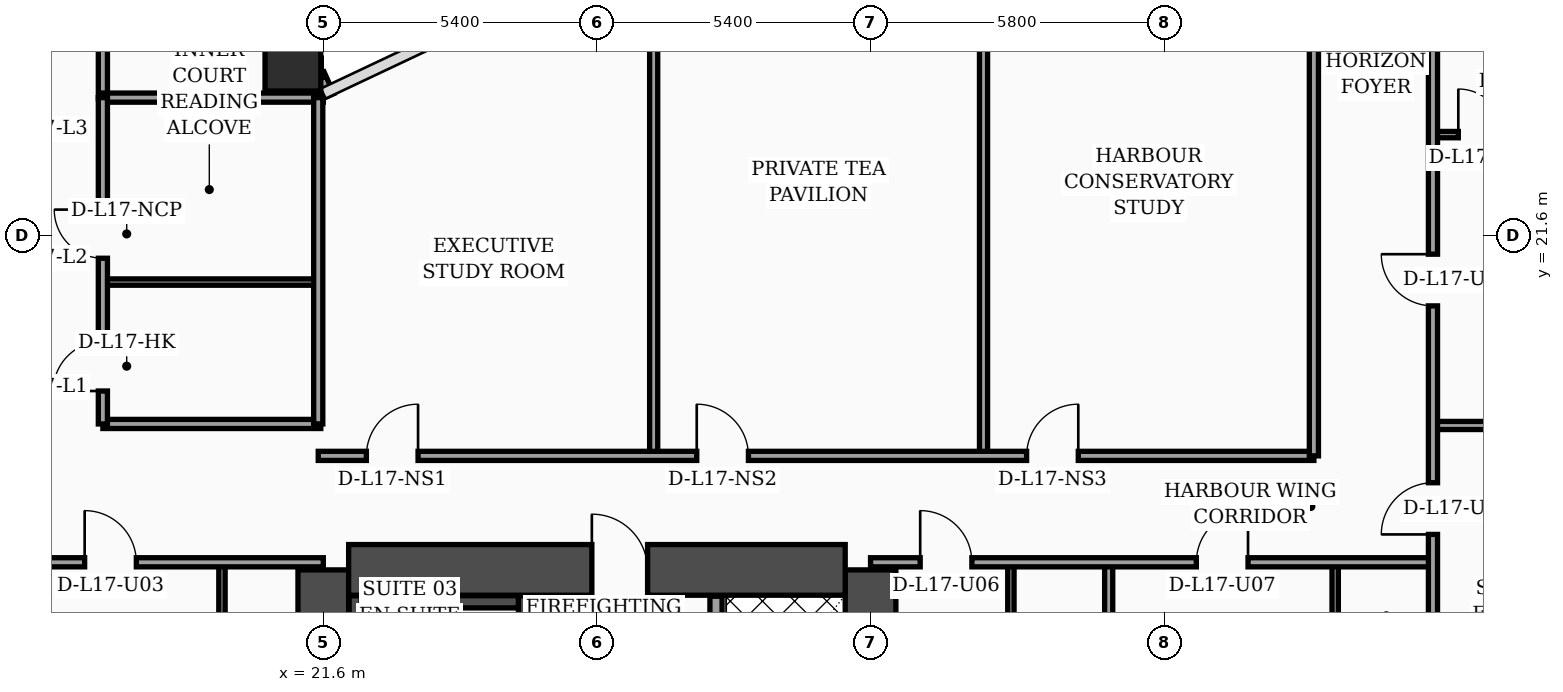
"""IFC4 building model, lengths in metres.
Left out: names, types, materials, properties, quantities, classifications, styles, units other than length and angle.
Written with IfcOpenShell. Run it as: python <this file> out.ifc"""

import sys

from ifc_helpers import new_model, si_unit, direction, frame, frame_2d, origin, origin_2d, place, context, subcontext, project, spatial, rectangle, hollow_rectangle, extrude, element, fill, save


model = new_model("IFC4")
c1 = context("Model", 3, precision=1e-05, world=origin(), true_north=direction((0.0, 1.0)))
c2 = subcontext(c1, "Body", "Model", "MODEL_VIEW")
j1 = project(units=[si_unit("LENGTHUNIT", "METRE"), si_unit("PLANEANGLEUNIT", "RADIAN")], contexts=[c1])
p1 = place(None, origin())
s1 = spatial("IfcSite", under=j1, at=p1, CompositionType="ELEMENT")
p2 = place(p1, origin())
s2 = spatial("IfcBuilding", under=s1, at=p2, CompositionType="ELEMENT")
p3 = place(p2, frame((0.0, 0.0, 73.6)))
s3 = spatial("IfcBuildingStorey", under=s2, at=p3, CompositionType="ELEMENT", Elevation=73.6)
for number, where, z_axis, x_axis in (
    (1, (21.6, 4.6, 0.0), (0.0, 0.0, 1.0), (0.0, 1.0, 0.0)),
    (2, (32.4, 4.6, 0.0), (0.0, 0.0, 1.0), (0.0, 1.0, 0.0)),
):
    element("IfcWall", number, at=place(p3, frame(where, z_axis=z_axis, x_axis=x_axis)), inside=s3, PredefinedType="SHEAR", context=c2, shape_type="SweptSolid", body=[
        extrude(rectangle(XDim=10.4, YDim=1.0, at=frame_2d((5.2, 0.0))), origin(), (0.0, 0.0, 1.0), 3.56),
    ])
p4 = place(p3, frame((22.1, 15.0, 0.0), z_axis=(0.0, 0.0, 1.0), x_axis=(1.0, 0.0, 0.0)))
e3 = element("IfcWall", 3, at=p4, inside=s3, PredefinedType="SHEAR", context=c2, shape_type="SweptSolid", body=[
    extrude(rectangle(XDim=9.8, YDim=1.0, at=frame_2d((4.9, 0.0))), origin(), (0.0, 0.0, 1.0), 3.56),
])
p5 = place(p4, frame((4.8, 0.0, 0.0)))
e4 = element("IfcOpeningElement", 4, at=p5, cuts=e3, PredefinedType="OPENING", context=c2, shape_type="SweptSolid", body=[
    extrude(rectangle(XDim=1.1, YDim=2.2, at=frame_2d((0.55, 1.1))), frame((0.0, 0.51, 0.0), z_axis=(0.0, -1.0, 0.0), x_axis=(1.0, 0.0, 0.0)), (0.0, 0.0, 1.0), 1.02),
])
p6 = place(p3, frame((22.23, 5.1, 0.0), z_axis=(0.0, 0.0, 1.0), x_axis=(0.0, 1.0, 0.0)))
e5 = element("IfcWall", 5, at=p6, inside=s3, PredefinedType="SOLIDWALL", context=c2, shape_type="SweptSolid", body=[
    extrude(rectangle(XDim=9.39, YDim=0.24, at=frame_2d((4.695, 0.0))), origin(), (0.0, 0.0, 1.0), 3.56),
])
p7 = place(p3, frame((25.57, 5.1, 0.0), z_axis=(0.0, 0.0, 1.0), x_axis=(0.0, 1.0, 0.0)))
e6 = element("IfcWall", 6, at=p7, inside=s3, PredefinedType="SOLIDWALL", context=c2, shape_type="SweptSolid", body=[
    extrude(rectangle(XDim=9.39, YDim=0.24, at=frame_2d((4.695, 0.0))), origin(), (0.0, 0.0, 1.0), 3.56),
])
p8 = place(p7, frame((0.35, 0.0, 0.0)))
e7 = element("IfcOpeningElement", 7, at=p8, cuts=e6, PredefinedType="OPENING", context=c2, shape_type="SweptSolid", body=[
    extrude(rectangle(XDim=1.15, YDim=2.2, at=frame_2d((0.575, 1.1))), frame((0.0, 0.13, 0.0), z_axis=(0.0, -1.0, 0.0), x_axis=(1.0, 0.0, 0.0)), (0.0, 0.0, 1.0), 0.26),
])
p9 = place(p3, frame((22.35, 14.37, 0.0), z_axis=(0.0, 0.0, 1.0), x_axis=(1.0, 0.0, 0.0)))
e8 = element("IfcWall", 8, at=p9, inside=s3, PredefinedType="SOLIDWALL", context=c2, shape_type="SweptSolid", body=[
    extrude(rectangle(XDim=3.1, YDim=0.24, at=frame_2d((1.55, 0.0))), origin(), (0.0, 0.0, 1.0), 3.56),
])
p10 = place(p3, frame((21.0, 25.0, 0.0), z_axis=(0.0, 0.0, 1.0), x_axis=(1.0, 0.0, 0.0)))
e9 = element("IfcColumn", 9, at=p10, inside=s3, PredefinedType="COLUMN", context=c2, shape_type="SweptSolid", body=[
    extrude(hollow_rectangle(XDim=1.1, YDim=1.1, WallThickness=0.045, at=origin_2d()), origin(), (0.0, 0.0, 1.0), 3.56),
])
p11 = place(p3, frame((21.68, 24.34, 0.0), z_axis=(0.0, 0.0, 1.0), x_axis=(-0.40758134973, 0.913168901875, 0.0)))
e10 = element("IfcWall", 10, at=p11, inside=s3, PredefinedType="SOLIDWALL", context=c2, shape_type="SweptSolid", body=[
    extrude(rectangle(XDim=0.471, YDim=0.28, at=frame_2d((0.235, 0.0))), origin(), (0.0, 0.0, 1.0), 3.56),
])
p12 = place(p3, frame((29.35, 5.12, 0.0), z_axis=(0.0, 0.0, 1.0), x_axis=(0.0, 1.0, 0.0)))
e11 = element("IfcWall", 11, at=p12, inside=s3, PredefinedType="SOLIDWALL", context=c2, shape_type="SweptSolid", body=[
    extrude(rectangle(XDim=9.36, YDim=0.24, at=frame_2d((4.68, 0.0))), origin(), (0.0, 0.0, 1.0), 3.56),
])
p13 = place(p12, frame((0.55, 0.0, 0.0)))
e12 = element("IfcOpeningElement", 12, at=p13, cuts=e11, PredefinedType="OPENING", context=c2, shape_type="SweptSolid", body=[
    extrude(rectangle(XDim=1.3, YDim=2.35, at=frame_2d((0.65, 1.175))), frame((0.0, 0.13, 0.0), z_axis=(0.0, -1.0, 0.0), x_axis=(1.0, 0.0, 0.0)), (0.0, 0.0, 1.0), 0.26),
])
p14 = place(p3, frame((19.6, 2.44, 0.0), z_axis=(0.0, 0.0, 1.0), x_axis=(0.0, 1.0, 0.0)))
e13 = element("IfcWall", 13, at=p14, inside=s3, PredefinedType="PARTITIONING", context=c2, shape_type="SweptSolid", body=[
    extrude(rectangle(XDim=12.71, YDim=0.125, at=frame_2d((6.355, 0.0))), origin(), (0.0, 0.0, 1.0), 2.34),
])
p15 = place(p14, frame((4.34, 0.0, 0.0)))
e14 = element("IfcOpeningElement", 14, at=p15, cuts=e13, PredefinedType="OPENING", context=c2, shape_type="SweptSolid", body=[
    extrude(rectangle(XDim=0.96, YDim=2.2, at=frame_2d((0.48, 1.1))), frame((0.0, 0.073, 0.0), z_axis=(0.0, -1.0, 0.0), x_axis=(1.0, 0.0, 0.0)), (0.0, 0.0, 1.0), 0.145),
])
p16 = place(p14, frame((10.18, 0.0, 0.0)))
e15 = element("IfcOpeningElement", 15, at=p16, cuts=e13, PredefinedType="OPENING", context=c2, shape_type="SweptSolid", body=[
    extrude(rectangle(XDim=0.9, YDim=2.15, at=frame_2d((0.45, 1.075))), frame((0.0, 0.073, 0.0), z_axis=(0.0, -1.0, 0.0), x_axis=(1.0, 0.0, 0.0)), (0.0, 0.0, 1.0), 0.145),
])
p17 = place(p3, frame((15.15, 15.15, 0.0), z_axis=(0.0, 0.0, 1.0), x_axis=(1.0, 0.0, 0.0)))
e16 = element("IfcWall", 16, at=p17, inside=s3, PredefinedType="PARTITIONING", context=c2, shape_type="SweptSolid", body=[
    extrude(rectangle(XDim=6.45, YDim=0.18, at=frame_2d((3.225, 0.0))), origin(), (0.0, 0.0, 1.0), 2.34),
])
p18 = place(p17, frame((1.74, 0.0, 0.0)))
e17 = element("IfcOpeningElement", 17, at=p18, cuts=e16, PredefinedType="OPENING", context=c2, shape_type="SweptSolid", body=[
    extrude(rectangle(XDim=1.02, YDim=2.2, at=frame_2d((0.51, 1.1))), frame((0.0, 0.1, 0.0), z_axis=(0.0, -1.0, 0.0), x_axis=(1.0, 0.0, 0.0)), (0.0, 0.0, 1.0), 0.2),
])
p19 = place(p3, frame((17.25, 24.3, 0.0), z_axis=(0.0, 0.0, 1.0), x_axis=(0.0, 1.0, 0.0)))
e18 = element("IfcWall", 18, at=p19, inside=s3, PredefinedType="PARTITIONING", context=c2, shape_type="SweptSolid", body=[
    extrude(rectangle(XDim=16.4, YDim=0.18, at=frame_2d((8.2, 0.0))), origin(), (0.0, 0.0, 1.0), 2.84),
])
p20 = place(p3, frame((17.25, 17.88, 0.0), z_axis=(0.0, 0.0, 1.0), x_axis=(1.0, 0.0, 0.0)))
e19 = element("IfcWall", 19, at=p20, inside=s3, PredefinedType="PARTITIONING", context=c2, shape_type="SweptSolid", body=[
    extrude(rectangle(XDim=4.3, YDim=0.18, at=frame_2d((2.15, 0.0))), origin(), (0.0, 0.0, 1.0), 3.56),
])
p21 = place(p3, frame((17.25, 20.68, 0.0), z_axis=(0.0, 0.0, 1.0), x_axis=(1.0, 0.0, 0.0)))
e20 = element("IfcWall", 20, at=p21, inside=s3, PredefinedType="PARTITIONING", context=c2, shape_type="SweptSolid", body=[
    extrude(rectangle(XDim=4.3, YDim=0.125, at=frame_2d((2.15, 0.0))), origin(), (0.0, 0.0, 1.0), 3.56),
])
p22 = place(p3, frame((17.25, 24.32, 0.0), z_axis=(0.0, 0.0, 1.0), x_axis=(1.0, 0.0, 0.0)))
e21 = element("IfcWall", 21, at=p22, inside=s3, PredefinedType="PARTITIONING", context=c2, shape_type="SweptSolid", body=[
    extrude(rectangle(XDim=4.35, YDim=0.18, at=frame_2d((2.175, 0.0))), origin(), (0.0, 0.0, 1.0), 3.56),
])
p23 = place(p3, frame((21.5, 17.88, 0.0), z_axis=(0.0, 0.0, 1.0), x_axis=(0.0, 1.0, 0.0)))
e22 = element("IfcWall", 22, at=p23, inside=s3, PredefinedType="PARTITIONING", context=c2, shape_type="SweptSolid", body=[
    extrude(rectangle(XDim=6.44, YDim=0.18, at=frame_2d((3.22, 0.0))), origin(), (0.0, 0.0, 1.0), 3.56),
])
p24 = place(p3, frame((17.25, 17.88, 0.0), z_axis=(0.0, 0.0, 1.0), x_axis=(0.0, 1.0, 0.0)))
e23 = element("IfcWall", 23, at=p24, inside=s3, PredefinedType="PARTITIONING", context=c2, shape_type="SweptSolid", body=[
    extrude(rectangle(XDim=6.44, YDim=0.18, at=frame_2d((3.22, 0.0))), origin(), (0.0, 0.0, 1.0), 3.56),
])
p25 = place(p24, frame((0.65, 0.0, 0.0)))
e24 = element("IfcOpeningElement", 24, at=p25, cuts=e23, PredefinedType="OPENING", context=c2, shape_type="SweptSolid", body=[
    extrude(rectangle(XDim=0.98, YDim=2.15, at=frame_2d((0.49, 1.075))), frame((0.0, 0.1, 0.0), z_axis=(0.0, -1.0, 0.0), x_axis=(1.0, 0.0, 0.0)), (0.0, 0.0, 1.0), 0.2),
])
p26 = place(p24, frame((3.27, 0.0, 0.0)))
e25 = element("IfcOpeningElement", 25, at=p26, cuts=e23, PredefinedType="OPENING", context=c2, shape_type="SweptSolid", body=[
    extrude(rectangle(XDim=0.96, YDim=2.2, at=frame_2d((0.48, 1.1))), frame((0.0, 0.1, 0.0), z_axis=(0.0, -1.0, 0.0), x_axis=(1.0, 0.0, 0.0)), (0.0, 0.0, 1.0), 0.2),
])
p27 = place(p3, frame((35.17, 2.44, 0.0), z_axis=(0.0, 0.0, 1.0), x_axis=(0.0, 1.0, 0.0)))
e26 = element("IfcWall", 26, at=p27, inside=s3, PredefinedType="PARTITIONING", context=c2, shape_type="SweptSolid", body=[
    extrude(rectangle(XDim=12.71, YDim=0.125, at=frame_2d((6.355, 0.0))), origin(), (0.0, 0.0, 1.0), 2.84),
])
p28 = place(p27, frame((4.35, 0.0, 0.0)))
e27 = element("IfcOpeningElement", 27, at=p28, cuts=e26, PredefinedType="OPENING", context=c2, shape_type="SweptSolid", body=[
    extrude(rectangle(XDim=0.96, YDim=2.2, at=frame_2d((0.48, 1.1))), frame((0.0, 0.073, 0.0), z_axis=(0.0, -1.0, 0.0), x_axis=(1.0, 0.0, 0.0)), (0.0, 0.0, 1.0), 0.145),
])
p29 = place(p27, frame((10.21, 0.0, 0.0)))
e28 = element("IfcOpeningElement", 28, at=p29, cuts=e26, PredefinedType="OPENING", context=c2, shape_type="SweptSolid", body=[
    extrude(rectangle(XDim=0.9, YDim=2.15, at=frame_2d((0.45, 1.075))), frame((0.0, 0.073, 0.0), z_axis=(0.0, -1.0, 0.0), x_axis=(1.0, 0.0, 0.0)), (0.0, 0.0, 1.0), 0.145),
])
p30 = place(p3, frame((41.57, 2.44, 0.0), z_axis=(0.0, 0.0, 1.0), x_axis=(0.0, 1.0, 0.0)))
e29 = element("IfcWall", 29, at=p30, inside=s3, PredefinedType="PARTITIONING", context=c2, shape_type="SweptSolid", body=[
    extrude(rectangle(XDim=12.71, YDim=0.125, at=frame_2d((6.355, 0.0))), origin(), (0.0, 0.0, 1.0), 3.04),
])
p31 = place(p30, frame((4.35, 0.0, 0.0)))
e30 = element("IfcOpeningElement", 30, at=p31, cuts=e29, PredefinedType="OPENING", context=c2, shape_type="SweptSolid", body=[
    extrude(rectangle(XDim=0.96, YDim=2.2, at=frame_2d((0.48, 1.1))), frame((0.0, 0.073, 0.0), z_axis=(0.0, -1.0, 0.0), x_axis=(1.0, 0.0, 0.0)), (0.0, 0.0, 1.0), 0.145),
])
p32 = place(p30, frame((10.21, 0.0, 0.0)))
e31 = element("IfcOpeningElement", 31, at=p32, cuts=e29, PredefinedType="OPENING", context=c2, shape_type="SweptSolid", body=[
    extrude(rectangle(XDim=0.9, YDim=2.15, at=frame_2d((0.45, 1.075))), frame((0.0, 0.073, 0.0), z_axis=(0.0, -1.0, 0.0), x_axis=(1.0, 0.0, 0.0)), (0.0, 0.0, 1.0), 0.145),
])
p33 = place(p3, frame((37.1, 2.44, 0.0), z_axis=(0.0, 0.0, 1.0), x_axis=(0.0, 1.0, 0.0)))
e32 = element("IfcWall", 32, at=p33, inside=s3, PredefinedType="PARTITIONING", context=c2, shape_type="SweptSolid", body=[
    extrude(rectangle(XDim=12.71, YDim=0.16, at=frame_2d((6.355, 0.0))), origin(), (0.0, 0.0, 1.0), 2.84),
])
p34 = place(p3, frame((32.4, 15.15, 0.0), z_axis=(0.0, 0.0, 1.0), x_axis=(1.0, 0.0, 0.0)))
e33 = element("IfcWall", 33, at=p34, inside=s3, PredefinedType="PARTITIONING", context=c2, shape_type="SweptSolid", body=[
    extrude(rectangle(XDim=11.1, YDim=0.18, at=frame_2d((5.55, 0.0))), origin(), (0.0, 0.0, 1.0), 2.84),
])
p35 = place(p34, frame((0.98, 0.0, 0.0)))
e34 = element("IfcOpeningElement", 34, at=p35, cuts=e33, PredefinedType="OPENING", context=c2, shape_type="SweptSolid", body=[
    extrude(rectangle(XDim=1.02, YDim=2.2, at=frame_2d((0.51, 1.1))), frame((0.0, 0.1, 0.0), z_axis=(0.0, -1.0, 0.0), x_axis=(1.0, 0.0, 0.0)), (0.0, 0.0, 1.0), 0.2),
])
p36 = place(p34, frame((6.43, 0.0, 0.0)))
e35 = element("IfcOpeningElement", 35, at=p36, cuts=e33, PredefinedType="OPENING", context=c2, shape_type="SweptSolid", body=[
    extrude(rectangle(XDim=1.02, YDim=2.2, at=frame_2d((0.51, 1.1))), frame((0.0, 0.1, 0.0), z_axis=(0.0, -1.0, 0.0), x_axis=(1.0, 0.0, 0.0)), (0.0, 0.0, 1.0), 0.2),
])
p37 = place(p3, frame((28.12, 17.25, 0.0), z_axis=(0.0, 0.0, 1.0), x_axis=(0.0, 1.0, 0.0)))
e36 = element("IfcWall", 36, at=p37, inside=s3, PredefinedType="PARTITIONING", context=c2, shape_type="SweptSolid", body=[
    extrude(rectangle(XDim=10.31, YDim=0.16, at=frame_2d((5.155, 0.0))), origin(), (0.0, 0.0, 1.0), 2.84),
])
p38 = place(p3, frame((34.63, 17.25, 0.0), z_axis=(0.0, 0.0, 1.0), x_axis=(0.0, 1.0, 0.0)))
e37 = element("IfcWall", 37, at=p38, inside=s3, PredefinedType="PARTITIONING", context=c2, shape_type="SweptSolid", body=[
    extrude(rectangle(XDim=13.38, YDim=0.16, at=frame_2d((6.69, 0.0))), origin(), (0.0, 0.0, 1.0), 2.84),
])
p39 = place(p3, frame((21.5, 17.25, 0.0), z_axis=(0.0, 0.0, 1.0), x_axis=(1.0, 0.0, 0.0)))
e38 = element("IfcWall", 38, at=p39, inside=s3, PredefinedType="PARTITIONING", context=c2, shape_type="SweptSolid", body=[
    extrude(rectangle(XDim=19.65, YDim=0.18, at=frame_2d((9.825, 0.0))), origin(), (0.0, 0.0, 1.0), 2.84),
])
p40 = place(p39, frame((0.95, 0.0, 0.0)))
e39 = element("IfcOpeningElement", 39, at=p40, cuts=e38, PredefinedType="OPENING", context=c2, shape_type="SweptSolid", body=[
    extrude(rectangle(XDim=1.02, YDim=2.2, at=frame_2d((0.51, 1.1))), frame((0.0, 0.1, 0.0), z_axis=(0.0, -1.0, 0.0), x_axis=(1.0, 0.0, 0.0)), (0.0, 0.0, 1.0), 0.2),
])
p41 = place(p39, frame((7.47, 0.0, 0.0)))
e40 = element("IfcOpeningElement", 40, at=p41, cuts=e38, PredefinedType="OPENING", context=c2, shape_type="SweptSolid", body=[
    extrude(rectangle(XDim=1.02, YDim=2.2, at=frame_2d((0.51, 1.1))), frame((0.0, 0.1, 0.0), z_axis=(0.0, -1.0, 0.0), x_axis=(1.0, 0.0, 0.0)), (0.0, 0.0, 1.0), 0.2),
])
p42 = place(p39, frame((13.98, 0.0, 0.0)))
e41 = element("IfcOpeningElement", 41, at=p42, cuts=e38, PredefinedType="OPENING", context=c2, shape_type="SweptSolid", body=[
    extrude(rectangle(XDim=1.02, YDim=2.2, at=frame_2d((0.51, 1.1))), frame((0.0, 0.1, 0.0), z_axis=(0.0, -1.0, 0.0), x_axis=(1.0, 0.0, 0.0)), (0.0, 0.0, 1.0), 0.2),
])
p43 = place(p3, frame((41.15, 17.25, 0.0), z_axis=(0.0, 0.0, 1.0), x_axis=(0.0, 1.0, 0.0)))
e42 = element("IfcWall", 42, at=p43, inside=s3, PredefinedType="PARTITIONING", context=c2, shape_type="SweptSolid", body=[
    extrude(rectangle(XDim=16.46, YDim=0.18, at=frame_2d((8.23, 0.0))), origin(), (0.0, 0.0, 1.0), 2.84),
])
p44 = place(p3, frame((43.5, 23.59, 0.0), z_axis=(0.0, 0.0, 1.0), x_axis=(1.0, 0.0, 0.0)))
e43 = element("IfcWall", 43, at=p44, inside=s3, PredefinedType="PARTITIONING", context=c2, shape_type="SweptSolid", body=[
    extrude(rectangle(XDim=14.37, YDim=0.125, at=frame_2d((7.185, 0.0))), origin(), (0.0, 0.0, 1.0), 2.84),
])
p45 = place(p44, frame((0.5, 0.0, 0.0)))
e44 = element("IfcOpeningElement", 44, at=p45, cuts=e43, PredefinedType="OPENING", context=c2, shape_type="SweptSolid", body=[
    extrude(rectangle(XDim=0.9, YDim=2.15, at=frame_2d((0.45, 1.075))), frame((0.0, 0.073, 0.0), z_axis=(0.0, -1.0, 0.0), x_axis=(1.0, 0.0, 0.0)), (0.0, 0.0, 1.0), 0.145),
])
p46 = place(p44, frame((3.6, 0.0, 0.0)))
e45 = element("IfcOpeningElement", 45, at=p46, cuts=e43, PredefinedType="OPENING", context=c2, shape_type="SweptSolid", body=[
    extrude(rectangle(XDim=0.96, YDim=2.2, at=frame_2d((0.48, 1.1))), frame((0.0, 0.073, 0.0), z_axis=(0.0, -1.0, 0.0), x_axis=(1.0, 0.0, 0.0)), (0.0, 0.0, 1.0), 0.145),
])
p47 = place(p3, frame((43.5, 17.85, 0.0), z_axis=(0.0, 0.0, 1.0), x_axis=(1.0, 0.0, 0.0)))
e46 = element("IfcWall", 46, at=p47, inside=s3, PredefinedType="PARTITIONING", context=c2, shape_type="SweptSolid", body=[
    extrude(rectangle(XDim=16.18, YDim=0.16, at=frame_2d((8.09, 0.0))), origin(), (0.0, 0.0, 1.0), 2.84),
])
p48 = place(p3, frame((43.5, 2.44, 0.0), z_axis=(0.0, 0.0, 1.0), x_axis=(0.0, 1.0, 0.0)))
e47 = element("IfcWall", 47, at=p48, inside=s3, PredefinedType="PARTITIONING", context=c2, shape_type="SweptSolid", body=[
    extrude(rectangle(XDim=31.04, YDim=0.18, at=frame_2d((15.52, 0.0))), origin(), (0.0, 0.0, 1.0), 2.84),
])
p49 = place(p48, frame((13.26, 0.0, 0.0)))
e48 = element("IfcOpeningElement", 48, at=p49, cuts=e47, PredefinedType="OPENING", context=c2, shape_type="SweptSolid", body=[
    extrude(rectangle(XDim=1.02, YDim=2.2, at=frame_2d((0.51, 1.1))), frame((0.0, 0.1, 0.0), z_axis=(0.0, -1.0, 0.0), x_axis=(1.0, 0.0, 0.0)), (0.0, 0.0, 1.0), 0.2),
])
p50 = place(p48, frame((17.77, 0.0, 0.0)))
e49 = element("IfcOpeningElement", 49, at=p50, cuts=e47, PredefinedType="OPENING", context=c2, shape_type="SweptSolid", body=[
    extrude(rectangle(XDim=1.02, YDim=2.2, at=frame_2d((0.51, 1.1))), frame((0.0, 0.1, 0.0), z_axis=(0.0, -1.0, 0.0), x_axis=(1.0, 0.0, 0.0)), (0.0, 0.0, 1.0), 0.2),
])
p51 = place(p48, frame((25.58, 0.0, 0.0)))
e50 = element("IfcOpeningElement", 50, at=p51, cuts=e47, PredefinedType="OPENING", context=c2, shape_type="SweptSolid", body=[
    extrude(rectangle(XDim=1.02, YDim=2.2, at=frame_2d((0.51, 1.1))), frame((0.0, 0.1, 0.0), z_axis=(0.0, -1.0, 0.0), x_axis=(1.0, 0.0, 0.0)), (0.0, 0.0, 1.0), 0.2),
])
p52 = place(p18, origin())
e51 = element("IfcDoor", 51, at=p52, inside=s3, OperationType="SINGLE_SWING_LEFT", PredefinedType="DOOR", context=c2, shape_type="SweptSolid", body=[
    extrude(rectangle(XDim=1.02, YDim=2.2, at=frame_2d((0.51, 1.1))), frame((0.0, 0.025, 0.0), z_axis=(0.0, -1.0, 0.0), x_axis=(1.0, 0.0, 0.0)), (0.0, 0.0, 1.0), 0.05),
])
fill(e17, e51)
p53 = place(p25, origin())
e52 = element("IfcDoor", 52, at=p53, inside=s3, OperationType="SINGLE_SWING_LEFT", PredefinedType="DOOR", context=c2, shape_type="SweptSolid", body=[
    extrude(rectangle(XDim=0.98, YDim=2.15, at=frame_2d((0.49, 1.075))), frame((0.0, 0.025, 0.0), z_axis=(0.0, -1.0, 0.0), x_axis=(1.0, 0.0, 0.0)), (0.0, 0.0, 1.0), 0.05),
])
fill(e24, e52)
p54 = place(p26, origin())
e53 = element("IfcDoor", 53, at=p54, inside=s3, OperationType="SINGLE_SWING_RIGHT", PredefinedType="DOOR", context=c2, shape_type="SweptSolid", body=[
    extrude(rectangle(XDim=0.96, YDim=2.2, at=frame_2d((0.48, 1.1))), frame((0.0, 0.025, 0.0), z_axis=(0.0, -1.0, 0.0), x_axis=(1.0, 0.0, 0.0)), (0.0, 0.0, 1.0), 0.05),
])
fill(e25, e53)
p55 = place(p35, origin())
e54 = element("IfcDoor", 54, at=p55, inside=s3, OperationType="SINGLE_SWING_LEFT", PredefinedType="DOOR", context=c2, shape_type="SweptSolid", body=[
    extrude(rectangle(XDim=1.02, YDim=2.2, at=frame_2d((0.51, 1.1))), frame((0.0, 0.025, 0.0), z_axis=(0.0, -1.0, 0.0), x_axis=(1.0, 0.0, 0.0)), (0.0, 0.0, 1.0), 0.05),
])
fill(e34, e54)
p56 = place(p36, origin())
e55 = element("IfcDoor", 55, at=p56, inside=s3, OperationType="SINGLE_SWING_RIGHT", PredefinedType="DOOR", context=c2, shape_type="SweptSolid", body=[
    extrude(rectangle(XDim=1.02, YDim=2.2, at=frame_2d((0.51, 1.1))), frame((0.0, 0.025, 0.0), z_axis=(0.0, -1.0, 0.0), x_axis=(1.0, 0.0, 0.0)), (0.0, 0.0, 1.0), 0.05),
])
fill(e35, e55)
p57 = place(p40, origin())
e56 = element("IfcDoor", 56, at=p57, inside=s3, OperationType="SINGLE_SWING_RIGHT", PredefinedType="DOOR", context=c2, shape_type="SweptSolid", body=[
    extrude(rectangle(XDim=1.02, YDim=2.2, at=frame_2d((0.51, 1.1))), frame((0.0, 0.025, 0.0), z_axis=(0.0, -1.0, 0.0), x_axis=(1.0, 0.0, 0.0)), (0.0, 0.0, 1.0), 0.05),
])
fill(e39, e56)
p58 = place(p41, origin())
e57 = element("IfcDoor", 57, at=p58, inside=s3, OperationType="SINGLE_SWING_LEFT", PredefinedType="DOOR", context=c2, shape_type="SweptSolid", body=[
    extrude(rectangle(XDim=1.02, YDim=2.2, at=frame_2d((0.51, 1.1))), frame((0.0, 0.025, 0.0), z_axis=(0.0, -1.0, 0.0), x_axis=(1.0, 0.0, 0.0)), (0.0, 0.0, 1.0), 0.05),
])
fill(e40, e57)
p59 = place(p42, origin())
e58 = element("IfcDoor", 58, at=p59, inside=s3, OperationType="SINGLE_SWING_RIGHT", PredefinedType="DOOR", context=c2, shape_type="SweptSolid", body=[
    extrude(rectangle(XDim=1.02, YDim=2.2, at=frame_2d((0.51, 1.1))), frame((0.0, 0.025, 0.0), z_axis=(0.0, -1.0, 0.0), x_axis=(1.0, 0.0, 0.0)), (0.0, 0.0, 1.0), 0.05),
])
fill(e41, e58)
p60 = place(p45, origin())
e59 = element("IfcDoor", 59, at=p60, inside=s3, OperationType="SINGLE_SWING_LEFT", PredefinedType="DOOR", context=c2, shape_type="SweptSolid", body=[
    extrude(rectangle(XDim=0.9, YDim=2.15, at=frame_2d((0.45, 1.075))), frame((0.0, 0.025, 0.0), z_axis=(0.0, -1.0, 0.0), x_axis=(1.0, 0.0, 0.0)), (0.0, 0.0, 1.0), 0.05),
])
fill(e44, e59)
p61 = place(p49, origin())
e60 = element("IfcDoor", 60, at=p61, inside=s3, OperationType="SINGLE_SWING_LEFT", PredefinedType="DOOR", context=c2, shape_type="SweptSolid", body=[
    extrude(rectangle(XDim=1.02, YDim=2.2, at=frame_2d((0.51, 1.1))), frame((0.0, 0.025, 0.0), z_axis=(0.0, -1.0, 0.0), x_axis=(1.0, 0.0, 0.0)), (0.0, 0.0, 1.0), 0.05),
])
fill(e48, e60)
p62 = place(p50, origin())
e61 = element("IfcDoor", 61, at=p62, inside=s3, OperationType="SINGLE_SWING_RIGHT", PredefinedType="DOOR", context=c2, shape_type="SweptSolid", body=[
    extrude(rectangle(XDim=1.02, YDim=2.2, at=frame_2d((0.51, 1.1))), frame((0.0, 0.025, 0.0), z_axis=(0.0, -1.0, 0.0), x_axis=(1.0, 0.0, 0.0)), (0.0, 0.0, 1.0), 0.05),
])
fill(e49, e61)
p63 = place(p5, origin())
e62 = element("IfcDoor", 62, at=p63, inside=s3, OperationType="SINGLE_SWING_LEFT", PredefinedType="DOOR", context=c2, shape_type="SweptSolid", body=[
    extrude(rectangle(XDim=1.1, YDim=2.2, at=frame_2d((0.55, 1.1))), frame((0.0, 0.025, 0.0), z_axis=(0.0, -1.0, 0.0), x_axis=(1.0, 0.0, 0.0)), (0.0, 0.0, 1.0), 0.05),
])
fill(e4, e62)
save(model, sys.argv[1])
